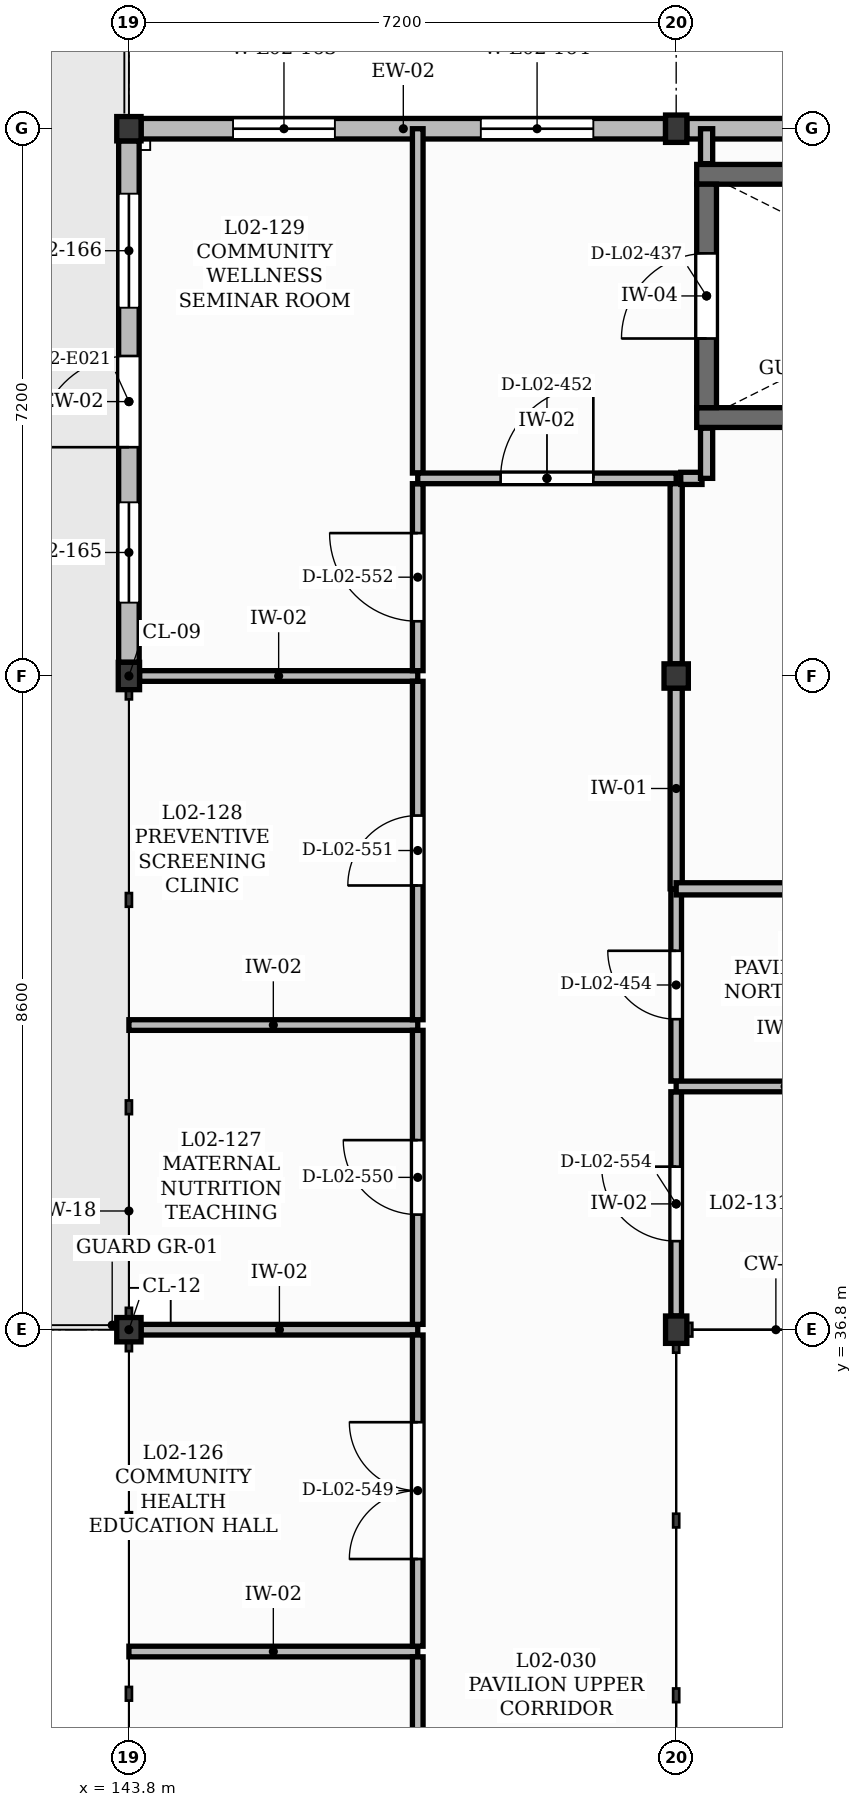
"""IFC4 building model, lengths in metres.
Left out: names, types, materials, properties, quantities, classifications, styles, units other than length and angle.
Written with IfcOpenShell. Run it as: python <this file> out.ifc"""

import sys

from ifc_helpers import new_model, si_unit, direction, frame, frame_2d, origin, origin_2d, place, context, subcontext, project, spatial, rectangle, extrude, element, fill, save


model = new_model("IFC4")
c1 = context("Model", 3, precision=1e-05, world=origin(), true_north=direction((0.0, 1.0)))
c2 = subcontext(c1, "Body", "Model", "MODEL_VIEW")
j1 = project(units=[si_unit("LENGTHUNIT", "METRE"), si_unit("PLANEANGLEUNIT", "RADIAN")], contexts=[c1])
p1 = place(None, origin())
s1 = spatial("IfcSite", under=j1, at=p1, CompositionType="ELEMENT")
p2 = place(p1, origin())
s2 = spatial("IfcBuilding", under=s1, at=p2, CompositionType="ELEMENT")
p3 = place(p2, frame((0.0, 0.0, 9.0)))
s3 = spatial("IfcBuildingStorey", under=s2, at=p3, CompositionType="ELEMENT", Elevation=9.0)
p4 = place(p3, frame((143.8, 36.8, 0.0), z_axis=(0.0, 0.0, 1.0), x_axis=(1.0, 0.0, 0.0)))
e1 = element("IfcColumn", 1, at=p4, inside=s3, PredefinedType="COLUMN", context=c2, shape_type="SweptSolid", body=[
    extrude(rectangle(XDim=0.32, YDim=0.32, at=origin_2d()), origin(), (0.0, 0.0, 1.0), 3.98),
])
p5 = place(p3, frame((143.8, 45.4, 0.0), z_axis=(0.0, 0.0, 1.0), x_axis=(1.0, 0.0, 0.0)))
e2 = element("IfcColumn", 2, at=p5, inside=s3, PredefinedType="COLUMN", context=c2, shape_type="SweptSolid", body=[
    extrude(rectangle(XDim=0.28, YDim=0.36, at=origin_2d()), origin(), (0.0, 0.0, 1.0), 3.98),
])
p6 = place(p3, frame((143.8, 52.6, 0.0), z_axis=(0.0, 0.0, 1.0), x_axis=(1.0, 0.0, 0.0)))
e3 = element("IfcColumn", 3, at=p6, inside=s3, PredefinedType="COLUMN", context=c2, shape_type="SweptSolid", body=[
    extrude(rectangle(XDim=0.32, YDim=0.32, at=origin_2d()), origin(), (0.0, 0.0, 1.0), 3.98),
])
p7 = place(p3, frame((151.0, 36.8, 0.0), z_axis=(0.0, 0.0, 1.0), x_axis=(1.0, 0.0, 0.0)))
e4 = element("IfcColumn", 4, at=p7, inside=s3, PredefinedType="COLUMN", context=c2, shape_type="SweptSolid", body=[
    extrude(rectangle(XDim=0.28, YDim=0.36, at=origin_2d()), origin(), (0.0, 0.0, 1.0), 5.775),
])
p8 = place(p3, frame((151.0, 45.4, 0.0), z_axis=(0.0, 0.0, 1.0), x_axis=(1.0, 0.0, 0.0)))
e5 = element("IfcColumn", 5, at=p8, inside=s3, PredefinedType="COLUMN", context=c2, shape_type="SweptSolid", body=[
    extrude(rectangle(XDim=0.32, YDim=0.32, at=origin_2d()), origin(), (0.0, 0.0, 1.0), 5.775),
])
p9 = place(p3, frame((151.0, 52.6, 0.0), z_axis=(0.0, 0.0, 1.0), x_axis=(1.0, 0.0, 0.0)))
e6 = element("IfcColumn", 6, at=p9, inside=s3, PredefinedType="COLUMN", context=c2, shape_type="SweptSolid", body=[
    extrude(rectangle(XDim=0.28, YDim=0.36, at=origin_2d()), origin(), (0.0, 0.0, 1.0), 5.775),
])
p10 = place(p3, frame((143.96, 52.6, 0.0), z_axis=(0.0, 0.0, 1.0), x_axis=(1.0, 0.0, 0.0)))
e7 = element("IfcWall", 7, at=p10, inside=s3, PredefinedType="SOLIDWALL", context=c2, shape_type="SweptSolid", body=[
    extrude(rectangle(XDim=6.9, YDim=0.27, at=frame_2d((3.45, 0.0))), origin(), (0.0, 0.0, 1.0), 3.54),
])
p11 = place(p10, frame((1.21, 0.0, 1.0)))
e8 = element("IfcOpeningElement", 8, at=p11, cuts=e7, PredefinedType="OPENING", context=c2, shape_type="SweptSolid", body=[
    extrude(rectangle(XDim=1.34, YDim=1.95, at=frame_2d((0.67, 0.975))), frame((0.0, 0.145, 0.0), z_axis=(0.0, -1.0, 0.0), x_axis=(1.0, 0.0, 0.0)), (0.0, 0.0, 1.0), 0.29),
])
p12 = place(p10, frame((4.47, 0.0, 1.0)))
e9 = element("IfcOpeningElement", 9, at=p12, cuts=e7, PredefinedType="OPENING", context=c2, shape_type="SweptSolid", body=[
    extrude(rectangle(XDim=1.48, YDim=1.95, at=frame_2d((0.74, 0.975))), frame((0.0, 0.145, 0.0), z_axis=(0.0, -1.0, 0.0), x_axis=(1.0, 0.0, 0.0)), (0.0, 0.0, 1.0), 0.29),
])
p13 = place(p3, frame((143.8, 45.58, 0.0), z_axis=(0.0, 0.0, 1.0), x_axis=(0.0, 1.0, 0.0)))
e10 = element("IfcWall", 10, at=p13, inside=s3, PredefinedType="SOLIDWALL", context=c2, shape_type="SweptSolid", body=[
    extrude(rectangle(XDim=6.86, YDim=0.27, at=frame_2d((3.43, 0.0))), origin(), (0.0, 0.0, 1.0), 4.0),
])
p14 = place(p13, frame((2.83, 0.0, 0.0)))
e11 = element("IfcOpeningElement", 11, at=p14, cuts=e10, PredefinedType="OPENING", context=c2, shape_type="SweptSolid", body=[
    extrude(rectangle(XDim=1.2, YDim=2.25, at=frame_2d((0.6, 1.125))), frame((0.0, 0.145, 0.0), z_axis=(0.0, -1.0, 0.0), x_axis=(1.0, 0.0, 0.0)), (0.0, 0.0, 1.0), 0.29),
])
p15 = place(p13, frame((0.785, 0.0, 1.5)))
e12 = element("IfcOpeningElement", 12, at=p15, cuts=e10, PredefinedType="OPENING", context=c2, shape_type="SweptSolid", body=[
    extrude(rectangle(XDim=1.32, YDim=1.25, at=frame_2d((0.66, 0.625))), frame((0.0, 0.145, 0.0), z_axis=(0.0, -1.0, 0.0), x_axis=(1.0, 0.0, 0.0)), (0.0, 0.0, 1.0), 0.29),
])
p16 = place(p13, frame((4.665, 0.0, 1.5)))
e13 = element("IfcOpeningElement", 13, at=p16, cuts=e10, PredefinedType="OPENING", context=c2, shape_type="SweptSolid", body=[
    extrude(rectangle(XDim=1.5, YDim=1.25, at=frame_2d((0.75, 0.625))), frame((0.0, 0.145, 0.0), z_axis=(0.0, -1.0, 0.0), x_axis=(1.0, 0.0, 0.0)), (0.0, 0.0, 1.0), 0.29),
])
p17 = place(p3, frame((151.14, 52.6, 0.0), z_axis=(0.0, 0.0, 1.0), x_axis=(1.0, 0.0, 0.0)))
e14 = element("IfcWall", 14, at=p17, inside=s3, PredefinedType="SOLIDWALL", context=c2, shape_type="SweptSolid", body=[
    extrude(rectangle(XDim=6.9, YDim=0.27, at=frame_2d((3.45, 0.0))), origin(), (0.0, 0.0, 1.0), 3.54),
])
for number, where, z_axis, x_axis in (
    (15, (151.27, 48.8, 0.0), (0.0, 0.0, 1.0), (1.0, 0.0, 0.0)),
    (16, (151.27, 52.0, 0.0), (0.0, 0.0, 1.0), (1.0, 0.0, 0.0)),
):
    element("IfcWall", number, at=place(p3, frame(where, z_axis=z_axis, x_axis=x_axis)), inside=s3, PredefinedType="SHEAR", context=c2, shape_type="SweptSolid", body=[
        extrude(rectangle(XDim=6.66, YDim=0.26, at=frame_2d((3.33, 0.0))), origin(), (0.0, 0.0, 1.0), 3.95),
    ])
p18 = place(p3, frame((151.4, 48.93, 0.0), z_axis=(0.0, 0.0, 1.0), x_axis=(0.0, 1.0, 0.0)))
e17 = element("IfcWall", 17, at=p18, inside=s3, PredefinedType="SHEAR", context=c2, shape_type="SweptSolid", body=[
    extrude(rectangle(XDim=2.94, YDim=0.26, at=frame_2d((1.47, 0.0))), origin(), (0.0, 0.0, 1.0), 3.95),
])
p19 = place(p18, frame((0.91, 0.0, 0.0)))
e18 = element("IfcOpeningElement", 18, at=p19, cuts=e17, PredefinedType="OPENING", context=c2, shape_type="SweptSolid", body=[
    extrude(rectangle(XDim=1.12, YDim=2.1, at=frame_2d((0.56, 1.05))), frame((0.0, 0.14, 0.0), z_axis=(0.0, -1.0, 0.0), x_axis=(1.0, 0.0, 0.0)), (0.0, 0.0, 1.0), 0.28),
])
p20 = place(p3, frame((143.8, 32.566, 0.0), z_axis=(0.0, 0.0, 1.0), x_axis=(1.0, 0.0, 0.0)))
e19 = element("IfcWall", 19, at=p20, inside=s3, PredefinedType="PARTITIONING", context=c2, shape_type="SweptSolid", body=[
    extrude(rectangle(XDim=3.8, YDim=0.14, at=frame_2d((1.9, 0.0))), origin(), (0.0, 0.0, 1.0), 3.78),
])
p21 = place(p3, frame((143.96, 36.8, 0.0), z_axis=(0.0, 0.0, 1.0), x_axis=(1.0, 0.0, 0.0)))
e20 = element("IfcWall", 20, at=p21, inside=s3, PredefinedType="PARTITIONING", context=c2, shape_type="SweptSolid", body=[
    extrude(rectangle(XDim=3.64, YDim=0.14, at=frame_2d((1.82, 0.0))), origin(), (0.0, 0.0, 1.0), 3.78),
])
p22 = place(p3, frame((143.8, 40.808, 0.0), z_axis=(0.0, 0.0, 1.0), x_axis=(1.0, 0.0, 0.0)))
e21 = element("IfcWall", 21, at=p22, inside=s3, PredefinedType="PARTITIONING", context=c2, shape_type="SweptSolid", body=[
    extrude(rectangle(XDim=3.8, YDim=0.14, at=frame_2d((1.9, 0.0))), origin(), (0.0, 0.0, 1.0), 3.78),
])
p23 = place(p3, frame((143.94, 45.4, 0.0), z_axis=(0.0, 0.0, 1.0), x_axis=(1.0, 0.0, 0.0)))
e22 = element("IfcWall", 22, at=p23, inside=s3, PredefinedType="PARTITIONING", context=c2, shape_type="SweptSolid", body=[
    extrude(rectangle(XDim=3.66, YDim=0.14, at=frame_2d((1.83, 0.0))), origin(), (0.0, 0.0, 1.0), 3.78),
])
p24 = place(p3, frame((147.6, 27.27, 0.0), z_axis=(0.0, 0.0, 1.0), x_axis=(0.0, 1.0, 0.0)))
e23 = element("IfcWall", 23, at=p24, inside=s3, PredefinedType="PARTITIONING", context=c2, shape_type="SweptSolid", body=[
    extrude(rectangle(XDim=5.226, YDim=0.14, at=frame_2d((2.613, 0.0))), origin(), (0.0, 0.0, 1.0), 3.78),
])
p25 = place(p24, frame((1.713, 0.0, 0.0)))
e24 = element("IfcOpeningElement", 24, at=p25, cuts=e23, PredefinedType="OPENING", context=c2, shape_type="SweptSolid", body=[
    extrude(rectangle(XDim=1.8, YDim=2.3, at=frame_2d((0.9, 1.15))), frame((0.0, 0.08, 0.0), z_axis=(0.0, -1.0, 0.0), x_axis=(1.0, 0.0, 0.0)), (0.0, 0.0, 1.0), 0.16),
])
p26 = place(p3, frame((147.6, 32.636, 0.0), z_axis=(0.0, 0.0, 1.0), x_axis=(0.0, 1.0, 0.0)))
e25 = element("IfcWall", 25, at=p26, inside=s3, PredefinedType="PARTITIONING", context=c2, shape_type="SweptSolid", body=[
    extrude(rectangle(XDim=4.094, YDim=0.14, at=frame_2d((2.047, 0.0))), origin(), (0.0, 0.0, 1.0), 3.78),
])
p27 = place(p26, frame((1.147, 0.0, 0.0)))
e26 = element("IfcOpeningElement", 26, at=p27, cuts=e25, PredefinedType="OPENING", context=c2, shape_type="SweptSolid", body=[
    extrude(rectangle(XDim=1.8, YDim=2.3, at=frame_2d((0.9, 1.15))), frame((0.0, 0.08, 0.0), z_axis=(0.0, -1.0, 0.0), x_axis=(1.0, 0.0, 0.0)), (0.0, 0.0, 1.0), 0.16),
])
p28 = place(p3, frame((147.6, 36.87, 0.0), z_axis=(0.0, 0.0, 1.0), x_axis=(0.0, 1.0, 0.0)))
e27 = element("IfcWall", 27, at=p28, inside=s3, PredefinedType="PARTITIONING", context=c2, shape_type="SweptSolid", body=[
    extrude(rectangle(XDim=3.868, YDim=0.14, at=frame_2d((1.934, 0.0))), origin(), (0.0, 0.0, 1.0), 3.78),
])
p29 = place(p28, frame((1.444, 0.0, 0.0)))
e28 = element("IfcOpeningElement", 28, at=p29, cuts=e27, PredefinedType="OPENING", context=c2, shape_type="SweptSolid", body=[
    extrude(rectangle(XDim=0.98, YDim=2.15, at=frame_2d((0.49, 1.075))), frame((0.0, 0.08, 0.0), z_axis=(0.0, -1.0, 0.0), x_axis=(1.0, 0.0, 0.0)), (0.0, 0.0, 1.0), 0.16),
])
p30 = place(p3, frame((147.6, 40.878, 0.0), z_axis=(0.0, 0.0, 1.0), x_axis=(0.0, 1.0, 0.0)))
e29 = element("IfcWall", 29, at=p30, inside=s3, PredefinedType="PARTITIONING", context=c2, shape_type="SweptSolid", body=[
    extrude(rectangle(XDim=4.452, YDim=0.14, at=frame_2d((2.226, 0.0))), origin(), (0.0, 0.0, 1.0), 3.78),
])
p31 = place(p30, frame((1.766, 0.0, 0.0)))
e30 = element("IfcOpeningElement", 30, at=p31, cuts=e29, PredefinedType="OPENING", context=c2, shape_type="SweptSolid", body=[
    extrude(rectangle(XDim=0.92, YDim=2.1, at=frame_2d((0.46, 1.05))), frame((0.0, 0.08, 0.0), z_axis=(0.0, -1.0, 0.0), x_axis=(1.0, 0.0, 0.0)), (0.0, 0.0, 1.0), 0.16),
])
p32 = place(p3, frame((147.6, 45.47, 0.0), z_axis=(0.0, 0.0, 1.0), x_axis=(0.0, 1.0, 0.0)))
e31 = element("IfcWall", 31, at=p32, inside=s3, PredefinedType="PARTITIONING", context=c2, shape_type="SweptSolid", body=[
    extrude(rectangle(XDim=2.46, YDim=0.14, at=frame_2d((1.23, 0.0))), origin(), (0.0, 0.0, 1.0), 3.78),
])
p33 = place(p32, frame((0.65, 0.0, 0.0)))
e32 = element("IfcOpeningElement", 32, at=p33, cuts=e31, PredefinedType="OPENING", context=c2, shape_type="SweptSolid", body=[
    extrude(rectangle(XDim=1.16, YDim=2.1, at=frame_2d((0.58, 1.05))), frame((0.0, 0.08, 0.0), z_axis=(0.0, -1.0, 0.0), x_axis=(1.0, 0.0, 0.0)), (0.0, 0.0, 1.0), 0.16),
])
p34 = place(p3, frame((147.6, 48.07, 0.0), z_axis=(0.0, 0.0, 1.0), x_axis=(0.0, 1.0, 0.0)))
e33 = element("IfcWall", 33, at=p34, inside=s3, PredefinedType="PARTITIONING", context=c2, shape_type="SweptSolid", body=[
    extrude(rectangle(XDim=4.53, YDim=0.14, at=frame_2d((2.265, 0.0))), origin(), (0.0, 0.0, 1.0), 3.78),
])
p35 = place(p3, frame((147.6, 48.0, 0.0), z_axis=(0.0, 0.0, 1.0), x_axis=(1.0, 0.0, 0.0)))
e34 = element("IfcWall", 34, at=p35, inside=s3, PredefinedType="PARTITIONING", context=c2, shape_type="SweptSolid", body=[
    extrude(rectangle(XDim=3.4, YDim=0.14, at=frame_2d((1.7, 0.0))), origin(), (0.0, 0.0, 1.0), 3.78),
])
p36 = place(p35, frame((1.09, 0.0, 0.0)))
e35 = element("IfcOpeningElement", 35, at=p36, cuts=e34, PredefinedType="OPENING", context=c2, shape_type="SweptSolid", body=[
    extrude(rectangle(XDim=1.22, YDim=2.1, at=frame_2d((0.61, 1.05))), frame((0.0, 0.08, 0.0), z_axis=(0.0, -1.0, 0.0), x_axis=(1.0, 0.0, 0.0)), (0.0, 0.0, 1.0), 0.16),
])
p37 = place(p3, frame((151.0, 36.98, 0.0), z_axis=(0.0, 0.0, 1.0), x_axis=(0.0, 1.0, 0.0)))
e36 = element("IfcWall", 36, at=p37, inside=s3, PredefinedType="PARTITIONING", context=c2, shape_type="SweptSolid", body=[
    extrude(rectangle(XDim=2.95, YDim=0.14, at=frame_2d((1.475, 0.0))), origin(), (0.0, 0.0, 1.0), 3.78),
])
p38 = place(p37, frame((0.985, 0.0, 0.0)))
e37 = element("IfcOpeningElement", 37, at=p38, cuts=e36, PredefinedType="OPENING", context=c2, shape_type="SweptSolid", body=[
    extrude(rectangle(XDim=0.98, YDim=2.15, at=frame_2d((0.49, 1.075))), frame((0.0, 0.08, 0.0), z_axis=(0.0, -1.0, 0.0), x_axis=(1.0, 0.0, 0.0)), (0.0, 0.0, 1.0), 0.16),
])
p39 = place(p3, frame((151.0, 40.07, 0.0), z_axis=(0.0, 0.0, 1.0), x_axis=(0.0, 1.0, 0.0)))
e38 = element("IfcWall", 38, at=p39, inside=s3, PredefinedType="PARTITIONING", context=c2, shape_type="SweptSolid", body=[
    extrude(rectangle(XDim=2.53, YDim=0.14, at=frame_2d((1.265, 0.0))), origin(), (0.0, 0.0, 1.0), 3.78),
])
p40 = place(p39, frame((0.815, 0.0, 0.0)))
e39 = element("IfcOpeningElement", 39, at=p40, cuts=e38, PredefinedType="OPENING", context=c2, shape_type="SweptSolid", body=[
    extrude(rectangle(XDim=0.9, YDim=2.1, at=frame_2d((0.45, 1.05))), frame((0.0, 0.08, 0.0), z_axis=(0.0, -1.0, 0.0), x_axis=(1.0, 0.0, 0.0)), (0.0, 0.0, 1.0), 0.16),
])
p41 = place(p3, frame((151.0, 40.0, 0.0), z_axis=(0.0, 0.0, 1.0), x_axis=(1.0, 0.0, 0.0)))
e40 = element("IfcWall", 40, at=p41, inside=s3, PredefinedType="PARTITIONING", context=c2, shape_type="SweptSolid", body=[
    extrude(rectangle(XDim=2.866, YDim=0.14, at=frame_2d((1.433, 0.0))), origin(), (0.0, 0.0, 1.0), 3.78),
])
p42 = place(p3, frame((151.0, 42.6, 0.0), z_axis=(0.0, 0.0, 1.0), x_axis=(0.0, 1.0, 0.0)))
e41 = element("IfcWall", 41, at=p42, inside=s3, PredefinedType="PARTITIONING", context=c2, shape_type="SweptSolid", body=[
    extrude(rectangle(XDim=2.64, YDim=0.16, at=frame_2d((1.32, 0.0))), origin(), (0.0, 0.0, 1.0), 3.78),
])
p43 = place(p3, frame((151.0, 45.56, 0.0), z_axis=(0.0, 0.0, 1.0), x_axis=(0.0, 1.0, 0.0)))
e42 = element("IfcWall", 42, at=p43, inside=s3, PredefinedType="PARTITIONING", context=c2, shape_type="SweptSolid", body=[
    extrude(rectangle(XDim=2.37, YDim=0.16, at=frame_2d((1.185, 0.0))), origin(), (0.0, 0.0, 1.0), 3.78),
])
p44 = place(p3, frame((151.06, 48.0, 0.0), z_axis=(0.0, 0.0, 1.0), x_axis=(1.0, 0.0, 0.0)))
e43 = element("IfcWall", 43, at=p44, inside=s3, PredefinedType="PARTITIONING", context=c2, shape_type="SweptSolid", body=[
    extrude(rectangle(XDim=0.28, YDim=0.16, at=frame_2d((0.14, 0.0))), origin(), (0.0, 0.0, 1.0), 3.78),
])
p45 = place(p3, frame((151.4, 48.0, 0.0), z_axis=(0.0, 0.0, 1.0), x_axis=(0.0, 1.0, 0.0)))
e44 = element("IfcWall", 44, at=p45, inside=s3, PredefinedType="PARTITIONING", context=c2, shape_type="SweptSolid", body=[
    extrude(rectangle(XDim=0.66, YDim=0.16, at=frame_2d((0.33, 0.0))), origin(), (0.0, 0.0, 1.0), 3.78),
])
p46 = place(p3, frame((151.4, 52.14, 0.0), z_axis=(0.0, 0.0, 1.0), x_axis=(0.0, 1.0, 0.0)))
e45 = element("IfcWall", 45, at=p46, inside=s3, PredefinedType="PARTITIONING", context=c2, shape_type="SweptSolid", body=[
    extrude(rectangle(XDim=0.46, YDim=0.16, at=frame_2d((0.23, 0.0))), origin(), (0.0, 0.0, 1.0), 3.78),
])
p47 = place(p3, frame((154.2, 42.6, 0.0), z_axis=(0.0, 0.0, 1.0), x_axis=(-1.0, 0.0, 0.0)))
e46 = element("IfcWall", 46, at=p47, inside=s3, PredefinedType="PARTITIONING", context=c2, shape_type="SweptSolid", body=[
    extrude(rectangle(XDim=3.2, YDim=0.16, at=frame_2d((1.6, 0.0))), origin(), (0.0, 0.0, 1.0), 3.78),
])
p48 = place(p11, origin())
e47 = element("IfcWindow", 47, at=p48, inside=s3, PartitioningType="SINGLE_PANEL", PredefinedType="WINDOW", context=c2, shape_type="SweptSolid", body=[
    extrude(rectangle(XDim=1.34, YDim=1.95, at=frame_2d((0.67, 0.975))), frame((0.0, 0.03, 0.0), z_axis=(0.0, -1.0, 0.0), x_axis=(1.0, 0.0, 0.0)), (0.0, 0.0, 1.0), 0.06),
])
fill(e8, e47)
p49 = place(p12, origin())
e48 = element("IfcWindow", 48, at=p49, inside=s3, PartitioningType="SINGLE_PANEL", PredefinedType="WINDOW", context=c2, shape_type="SweptSolid", body=[
    extrude(rectangle(XDim=1.48, YDim=1.95, at=frame_2d((0.74, 0.975))), frame((0.0, 0.03, 0.0), z_axis=(0.0, -1.0, 0.0), x_axis=(1.0, 0.0, 0.0)), (0.0, 0.0, 1.0), 0.06),
])
fill(e9, e48)
p50 = place(p14, origin())
e49 = element("IfcDoor", 49, at=p50, inside=s3, OperationType="SINGLE_SWING_LEFT", PredefinedType="DOOR", context=c2, shape_type="SweptSolid", body=[
    extrude(rectangle(XDim=1.2, YDim=2.25, at=frame_2d((0.6, 1.125))), frame((0.0, 0.025, 0.0), z_axis=(0.0, -1.0, 0.0), x_axis=(1.0, 0.0, 0.0)), (0.0, 0.0, 1.0), 0.05),
])
fill(e11, e49)
p51 = place(p15, origin())
e50 = element("IfcWindow", 50, at=p51, inside=s3, PartitioningType="SINGLE_PANEL", PredefinedType="WINDOW", context=c2, shape_type="SweptSolid", body=[
    extrude(rectangle(XDim=1.32, YDim=1.25, at=frame_2d((0.66, 0.625))), frame((0.0, 0.03, 0.0), z_axis=(0.0, -1.0, 0.0), x_axis=(1.0, 0.0, 0.0)), (0.0, 0.0, 1.0), 0.06),
])
fill(e12, e50)
p52 = place(p16, origin())
e51 = element("IfcWindow", 51, at=p52, inside=s3, PartitioningType="DOUBLE_PANEL_VERTICAL", PredefinedType="WINDOW", context=c2, shape_type="SweptSolid", body=[
    extrude(rectangle(XDim=1.5, YDim=1.25, at=frame_2d((0.75, 0.625))), frame((0.0, 0.03, 0.0), z_axis=(0.0, -1.0, 0.0), x_axis=(1.0, 0.0, 0.0)), (0.0, 0.0, 1.0), 0.06),
])
fill(e13, e51)
p53 = place(p19, origin())
e52 = element("IfcDoor", 52, at=p53, inside=s3, OperationType="SINGLE_SWING_LEFT", PredefinedType="DOOR", context=c2, shape_type="SweptSolid", body=[
    extrude(rectangle(XDim=1.12, YDim=2.1, at=frame_2d((0.56, 1.05))), frame((0.0, 0.025, 0.0), z_axis=(0.0, -1.0, 0.0), x_axis=(1.0, 0.0, 0.0)), (0.0, 0.0, 1.0), 0.05),
])
fill(e18, e52)
p54 = place(p36, origin())
e53 = element("IfcDoor", 53, at=p54, inside=s3, OperationType="SINGLE_SWING_RIGHT", PredefinedType="DOOR", context=c2, shape_type="SweptSolid", body=[
    extrude(rectangle(XDim=1.22, YDim=2.1, at=frame_2d((0.61, 1.05))), frame((0.0, 0.025, 0.0), z_axis=(0.0, -1.0, 0.0), x_axis=(1.0, 0.0, 0.0)), (0.0, 0.0, 1.0), 0.05),
])
fill(e35, e53)
p55 = place(p40, origin())
e54 = element("IfcDoor", 54, at=p55, inside=s3, OperationType="SINGLE_SWING_RIGHT", PredefinedType="DOOR", context=c2, shape_type="SweptSolid", body=[
    extrude(rectangle(XDim=0.9, YDim=2.1, at=frame_2d((0.45, 1.05))), frame((0.0, 0.025, 0.0), z_axis=(0.0, -1.0, 0.0), x_axis=(1.0, 0.0, 0.0)), (0.0, 0.0, 1.0), 0.05),
])
fill(e39, e54)
p56 = place(p27, origin())
e55 = element("IfcDoor", 55, at=p56, inside=s3, OperationType="DOUBLE_DOOR_SINGLE_SWING", PredefinedType="DOOR", context=c2, shape_type="SweptSolid", body=[
    extrude(rectangle(XDim=1.8, YDim=2.3, at=frame_2d((0.9, 1.15))), frame((0.0, 0.025, 0.0), z_axis=(0.0, -1.0, 0.0), x_axis=(1.0, 0.0, 0.0)), (0.0, 0.0, 1.0), 0.05),
])
fill(e26, e55)
p57 = place(p29, origin())
e56 = element("IfcDoor", 56, at=p57, inside=s3, OperationType="SINGLE_SWING_RIGHT", PredefinedType="DOOR", context=c2, shape_type="SweptSolid", body=[
    extrude(rectangle(XDim=0.98, YDim=2.15, at=frame_2d((0.49, 1.075))), frame((0.0, 0.025, 0.0), z_axis=(0.0, -1.0, 0.0), x_axis=(1.0, 0.0, 0.0)), (0.0, 0.0, 1.0), 0.05),
])
fill(e28, e56)
p58 = place(p31, origin())
e57 = element("IfcDoor", 57, at=p58, inside=s3, OperationType="SINGLE_SWING_LEFT", PredefinedType="DOOR", context=c2, shape_type="SweptSolid", body=[
    extrude(rectangle(XDim=0.92, YDim=2.1, at=frame_2d((0.46, 1.05))), frame((0.0, 0.025, 0.0), z_axis=(0.0, -1.0, 0.0), x_axis=(1.0, 0.0, 0.0)), (0.0, 0.0, 1.0), 0.05),
])
fill(e30, e57)
p59 = place(p33, origin())
e58 = element("IfcDoor", 58, at=p59, inside=s3, OperationType="SINGLE_SWING_RIGHT", PredefinedType="DOOR", context=c2, shape_type="SweptSolid", body=[
    extrude(rectangle(XDim=1.16, YDim=2.1, at=frame_2d((0.58, 1.05))), frame((0.0, 0.025, 0.0), z_axis=(0.0, -1.0, 0.0), x_axis=(1.0, 0.0, 0.0)), (0.0, 0.0, 1.0), 0.05),
])
fill(e32, e58)
p60 = place(p38, origin())
e59 = element("IfcDoor", 59, at=p60, inside=s3, OperationType="SINGLE_SWING_RIGHT", PredefinedType="DOOR", context=c2, shape_type="SweptSolid", body=[
    extrude(rectangle(XDim=0.98, YDim=2.15, at=frame_2d((0.49, 1.075))), frame((0.0, 0.025, 0.0), z_axis=(0.0, -1.0, 0.0), x_axis=(1.0, 0.0, 0.0)), (0.0, 0.0, 1.0), 0.05),
])
fill(e37, e59)
save(model, sys.argv[1])
